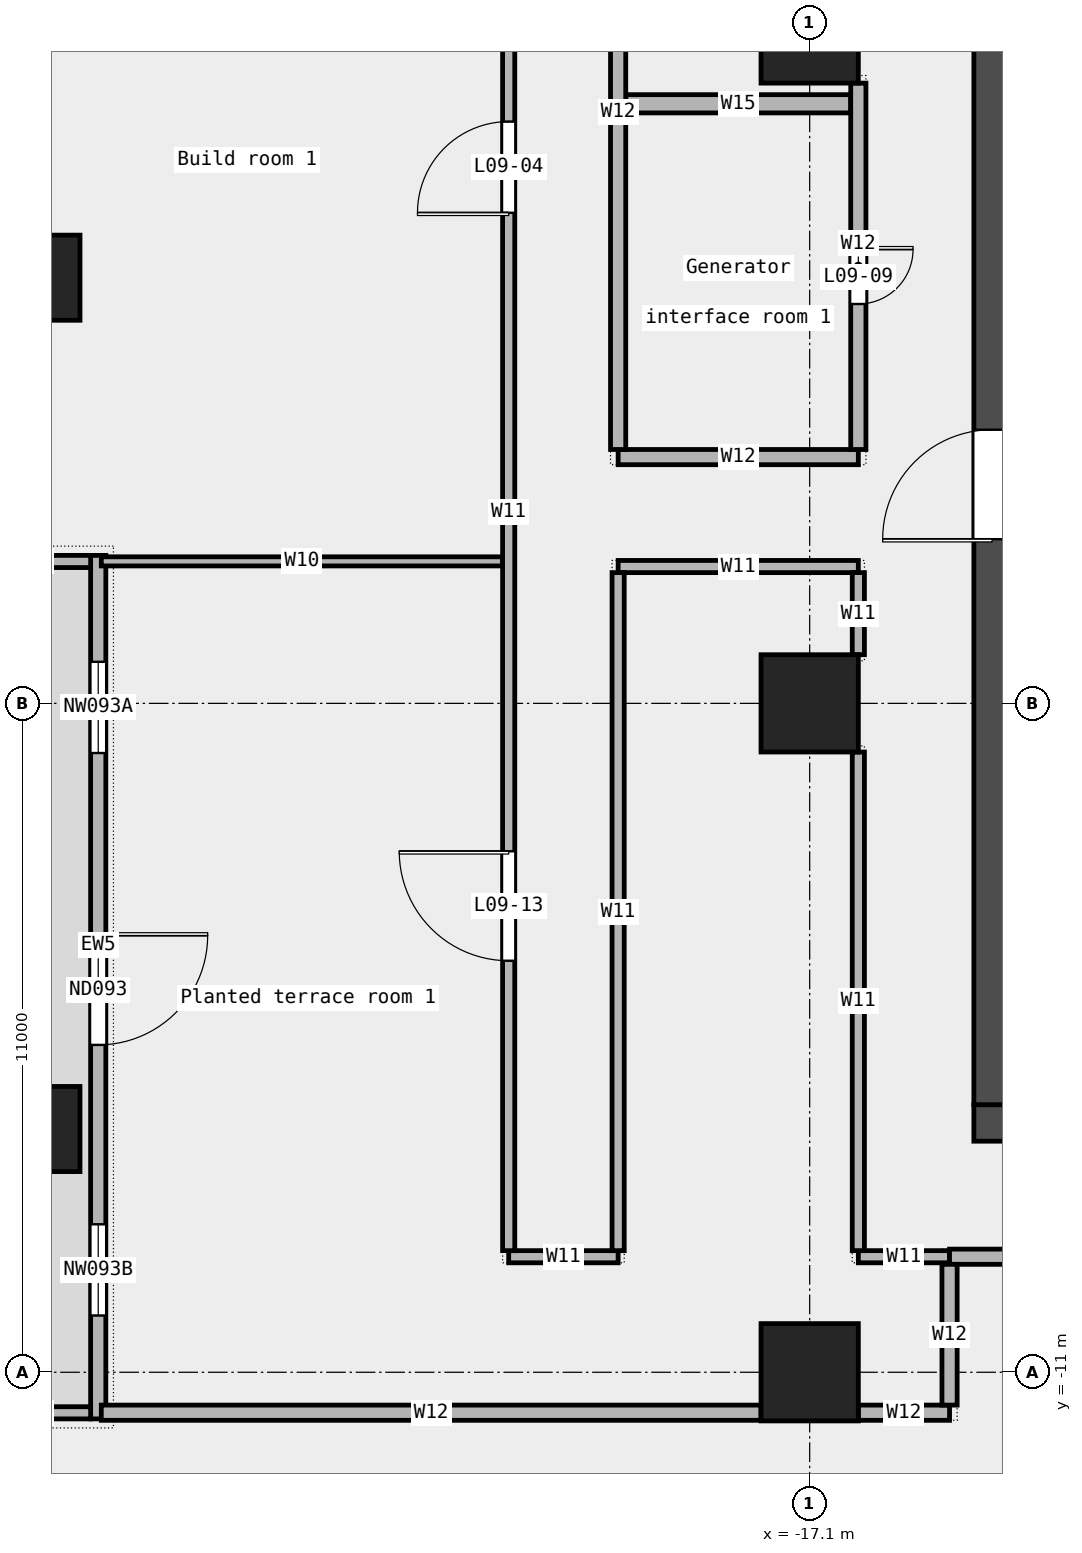
"""IFC4 building model, lengths in metres.
Left out: names, types, materials, properties, quantities, classifications, styles, units other than length and angle.
Written with IfcOpenShell. Run it as: python <this file> out.ifc"""

import sys

from ifc_helpers import new_model, si_unit, direction, frame, frame_2d, origin, origin_2d, place, context, subcontext, project, spatial, rectangle, extrude, element, fill, save


model = new_model("IFC4")
c1 = context("Model", 3, precision=1e-05, world=origin(), true_north=direction((0.0, 1.0)))
c2 = subcontext(c1, "Body", "Model", "MODEL_VIEW")
j1 = project(units=[si_unit("LENGTHUNIT", "METRE"), si_unit("PLANEANGLEUNIT", "RADIAN")], contexts=[c1])
p1 = place(None, origin())
s1 = spatial("IfcSite", under=j1, at=p1, CompositionType="ELEMENT")
p2 = place(p1, origin())
s2 = spatial("IfcBuilding", under=s1, at=p2, CompositionType="ELEMENT")
p3 = place(p2, frame((0.0, 0.0, 50.2)))
s3 = spatial("IfcBuildingStorey", under=s2, at=p3, CompositionType="ELEMENT", Elevation=50.2)
for number, where, z_axis, x_axis in (
    (1, (-29.8, 7.0, 0.0), (0.0, 0.0, 1.0), (1.0, 0.0, 0.0)),
    (2, (-29.8, -7.0, 0.0), (0.0, 0.0, 1.0), (1.0, 0.0, 0.0)),
):
    element("IfcColumn", number, at=place(p3, frame(where, z_axis=z_axis, x_axis=x_axis)), inside=s3, PredefinedType="COLUMN", context=c2, shape_type="SweptSolid", body=[
        extrude(rectangle(XDim=1.4, YDim=1.4, at=origin_2d()), origin(), (0.0, 0.0, 1.0), 4.35),
    ])
for number, where, z_axis, x_axis in (
    (3, (-17.1, -11.0, 0.0), (0.0, 0.0, 1.0), (1.0, 0.0, 0.0)),
    (4, (-17.1, 0.0, 0.0), (0.0, 0.0, 1.0), (1.0, 0.0, 0.0)),
    (5, (-17.1, 11.0, 0.0), (0.0, 0.0, 1.0), (1.0, 0.0, 0.0)),
):
    element("IfcColumn", number, at=place(p3, frame(where, z_axis=z_axis, x_axis=x_axis)), inside=s3, PredefinedType="COLUMN", context=c2, shape_type="SweptSolid", body=[
        extrude(rectangle(XDim=1.6, YDim=1.6, at=origin_2d()), origin(), (0.0, 0.0, 1.0), 4.35),
    ])
p4 = place(p3, frame((-28.8, 2.433, 0.0), z_axis=(0.0, 0.0, 1.0), x_axis=(0.0, -1.0, 0.0)))
e6 = element("IfcWall", 6, at=p4, inside=s3, PredefinedType="STANDARD", context=c2, shape_type="SweptSolid", body=[
    extrude(rectangle(XDim=14.2, YDim=0.25, at=frame_2d((7.1, 0.0))), origin(), (0.0, 0.0, 1.0), 4.35),
])
p5 = place(p4, frame((1.75, 0.0, 0.45)))
e7 = element("IfcOpeningElement", 7, at=p5, cuts=e6, PredefinedType="OPENING", context=c2, shape_type="SweptSolid", body=[
    extrude(rectangle(XDim=1.5, YDim=3.0, at=frame_2d((0.75, 1.5))), frame((0.0, 0.137, 0.0), z_axis=(0.0, -1.0, 0.0), x_axis=(1.0, 0.0, 0.0)), (0.0, 0.0, 1.0), 0.274),
])
p6 = place(p4, frame((6.25, 0.0, 0.0)))
e8 = element("IfcOpeningElement", 8, at=p6, cuts=e6, PredefinedType="OPENING", context=c2, shape_type="SweptSolid", body=[
    extrude(rectangle(XDim=1.8, YDim=2.4, at=frame_2d((0.9, 1.2))), frame((0.0, 0.137, 0.0), z_axis=(0.0, -1.0, 0.0), x_axis=(1.0, 0.0, 0.0)), (0.0, 0.0, 1.0), 0.274),
])
p7 = place(p4, frame((11.0, 0.0, 0.45)))
e9 = element("IfcOpeningElement", 9, at=p7, cuts=e6, PredefinedType="OPENING", context=c2, shape_type="SweptSolid", body=[
    extrude(rectangle(XDim=1.5, YDim=3.0, at=frame_2d((0.75, 1.5))), frame((0.0, 0.137, 0.0), z_axis=(0.0, -1.0, 0.0), x_axis=(1.0, 0.0, 0.0)), (0.0, 0.0, 1.0), 0.274),
])
for number, where, z_axis, x_axis in (
    (10, (-30.8, 2.333, 0.0), (0.0, 0.0, 1.0), (1.0, 0.0, 0.0)),
    (11, (-30.8, -11.667, 0.0), (0.0, 0.0, 1.0), (1.0, 0.0, 0.0)),
):
    element("IfcWall", number, at=place(p3, frame(where, z_axis=z_axis, x_axis=x_axis)), inside=s3, PredefinedType="STANDARD", context=c2, shape_type="SweptSolid", body=[
        extrude(rectangle(XDim=1.875, YDim=0.2, at=frame_2d((0.938, 0.0))), origin(), (0.0, 0.0, 1.0), 4.35),
    ])
p8 = place(p3, frame((-28.75, -11.665, 0.0), z_axis=(0.0, 0.0, 1.0), x_axis=(1.0, 0.0, 0.0)))
e12 = element("IfcWall", 12, at=p8, inside=s3, PredefinedType="PARTITIONING", context=c2, shape_type="SweptSolid", body=[
    extrude(rectangle(XDim=10.85, YDim=0.25, at=frame_2d((5.425, 0.0))), origin(), (0.0, 0.0, 1.0), 4.35),
])
p9 = place(p3, frame((-16.3, -11.665, 0.0), z_axis=(0.0, 0.0, 1.0), x_axis=(1.0, 0.0, 0.0)))
e13 = element("IfcWall", 13, at=p9, inside=s3, PredefinedType="PARTITIONING", context=c2, shape_type="SweptSolid", body=[
    extrude(rectangle(XDim=1.5, YDim=0.25, at=frame_2d((0.75, 0.0))), origin(), (0.0, 0.0, 1.0), 4.35),
])
p10 = place(p3, frame((-22.05, -9.1, 0.0), z_axis=(0.0, 0.0, 1.0), x_axis=(1.0, 0.0, 0.0)))
e14 = element("IfcWall", 14, at=p10, inside=s3, PredefinedType="PARTITIONING", context=c2, shape_type="SweptSolid", body=[
    extrude(rectangle(XDim=1.8, YDim=0.2, at=frame_2d((0.9, 0.0))), origin(), (0.0, 0.0, 1.0), 4.35),
])
p11 = place(p3, frame((-16.3, -9.1, 0.0), z_axis=(0.0, 0.0, 1.0), x_axis=(1.0, 0.0, 0.0)))
e15 = element("IfcWall", 15, at=p11, inside=s3, PredefinedType="PARTITIONING", context=c2, shape_type="SweptSolid", body=[
    extrude(rectangle(XDim=1.5, YDim=0.2, at=frame_2d((0.75, 0.0))), origin(), (0.0, 0.0, 1.0), 4.35),
])
p12 = place(p3, frame((-14.8, -9.1, 0.0), z_axis=(0.0, 0.0, 1.0), x_axis=(1.0, 0.0, 0.0)))
e16 = element("IfcWall", 16, at=p12, inside=s3, PredefinedType="PARTITIONING", context=c2, shape_type="SweptSolid", body=[
    extrude(rectangle(XDim=29.6, YDim=0.25, at=frame_2d((14.8, 0.0))), origin(), (0.0, 0.0, 1.0), 4.35),
])
p13 = place(p12, frame((4.802, 0.0, 0.0)))
e17 = element("IfcOpeningElement", 17, at=p13, cuts=e16, PredefinedType="OPENING", context=c2, shape_type="SweptSolid", body=[
    extrude(rectangle(XDim=1.8, YDim=2.1, at=frame_2d((0.9, 1.05))), frame((0.0, 0.137, 0.0), z_axis=(0.0, -1.0, 0.0), x_axis=(1.0, 0.0, 0.0)), (0.0, 0.0, 1.0), 0.274),
])
p14 = place(p12, frame((21.403, 0.0, 0.0)))
e18 = element("IfcOpeningElement", 18, at=p14, cuts=e16, PredefinedType="OPENING", context=c2, shape_type="SweptSolid", body=[
    extrude(rectangle(XDim=1.8, YDim=2.1, at=frame_2d((0.9, 1.05))), frame((0.0, 0.137, 0.0), z_axis=(0.0, -1.0, 0.0), x_axis=(1.0, 0.0, 0.0)), (0.0, 0.0, 1.0), 0.274),
])
p15 = place(p3, frame((-20.25, 2.25, 0.0), z_axis=(0.0, 0.0, 1.0), x_axis=(1.0, 0.0, 0.0)))
e19 = element("IfcWall", 19, at=p15, inside=s3, PredefinedType="PARTITIONING", context=c2, shape_type="SweptSolid", body=[
    extrude(rectangle(XDim=3.95, YDim=0.2, at=frame_2d((1.975, 0.0))), origin(), (0.0, 0.0, 1.0), 4.35),
])
p16 = place(p3, frame((-28.75, 2.335, 0.0), z_axis=(0.0, 0.0, 1.0), x_axis=(1.0, 0.0, 0.0)))
e20 = element("IfcWall", 20, at=p16, inside=s3, PredefinedType="PARTITIONING", context=c2, shape_type="SweptSolid", body=[
    extrude(rectangle(XDim=6.6, YDim=0.15, at=frame_2d((3.3, 0.0))), origin(), (0.0, 0.0, 1.0), 4.35),
])
p17 = place(p3, frame((-20.25, 4.05, 0.0), z_axis=(0.0, 0.0, 1.0), x_axis=(1.0, 0.0, 0.0)))
e21 = element("IfcWall", 21, at=p17, inside=s3, PredefinedType="PARTITIONING", context=c2, shape_type="SweptSolid", body=[
    extrude(rectangle(XDim=3.95, YDim=0.25, at=frame_2d((1.975, 0.0))), origin(), (0.0, 0.0, 1.0), 4.35),
])
p18 = place(p3, frame((-20.125, 9.86, 0.0), z_axis=(0.0, 0.0, 1.0), x_axis=(1.0, 0.0, 0.0)))
e22 = element("IfcWall", 22, at=p18, inside=s3, PredefinedType="PARTITIONING", context=c2, shape_type="SweptSolid", body=[
    extrude(rectangle(XDim=3.7, YDim=0.3, at=frame_2d((1.85, 0.0))), origin(), (0.0, 0.0, 1.0), 4.35),
])
p19 = place(p3, frame((-22.05, -9.0, 0.0), z_axis=(0.0, 0.0, 1.0), x_axis=(0.0, 1.0, 0.0)))
e23 = element("IfcWall", 23, at=p19, inside=s3, PredefinedType="PARTITIONING", context=c2, shape_type="SweptSolid", body=[
    extrude(rectangle(XDim=24.3, YDim=0.2, at=frame_2d((12.15, 0.0))), origin(), (0.0, 0.0, 1.0), 4.35),
])
p20 = place(p19, frame((17.067, 0.0, 0.0)))
e24 = element("IfcOpeningElement", 24, at=p20, cuts=e23, PredefinedType="OPENING", context=c2, shape_type="SweptSolid", body=[
    extrude(rectangle(XDim=1.5, YDim=2.1, at=frame_2d((0.75, 1.05))), frame((0.0, 0.112, 0.0), z_axis=(0.0, -1.0, 0.0), x_axis=(1.0, 0.0, 0.0)), (0.0, 0.0, 1.0), 0.224),
])
p21 = place(p19, frame((4.768, 0.0, 0.0)))
e25 = element("IfcOpeningElement", 25, at=p21, cuts=e23, PredefinedType="OPENING", context=c2, shape_type="SweptSolid", body=[
    extrude(rectangle(XDim=1.8, YDim=2.1, at=frame_2d((0.9, 1.05))), frame((0.0, 0.112, 0.0), z_axis=(0.0, -1.0, 0.0), x_axis=(1.0, 0.0, 0.0)), (0.0, 0.0, 1.0), 0.224),
])
p22 = place(p3, frame((-20.25, -9.0, 0.0), z_axis=(0.0, 0.0, 1.0), x_axis=(0.0, 1.0, 0.0)))
e26 = element("IfcWall", 26, at=p22, inside=s3, PredefinedType="PARTITIONING", context=c2, shape_type="SweptSolid", body=[
    extrude(rectangle(XDim=11.15, YDim=0.2, at=frame_2d((5.575, 0.0))), origin(), (0.0, 0.0, 1.0), 4.35),
])
p23 = place(p3, frame((-20.25, 4.175, 0.0), z_axis=(0.0, 0.0, 1.0), x_axis=(0.0, 1.0, 0.0)))
e27 = element("IfcWall", 27, at=p23, inside=s3, PredefinedType="PARTITIONING", context=c2, shape_type="SweptSolid", body=[
    extrude(rectangle(XDim=11.1, YDim=0.25, at=frame_2d((5.55, 0.0))), origin(), (0.0, 0.0, 1.0), 4.35),
])
p24 = place(p3, frame((-16.3, -9.0, 0.0), z_axis=(0.0, 0.0, 1.0), x_axis=(0.0, 1.0, 0.0)))
e28 = element("IfcWall", 28, at=p24, inside=s3, PredefinedType="PARTITIONING", context=c2, shape_type="SweptSolid", body=[
    extrude(rectangle(XDim=8.2, YDim=0.2, at=frame_2d((4.1, 0.0))), origin(), (0.0, 0.0, 1.0), 4.35),
])
p25 = place(p3, frame((-16.3, 0.8, 0.0), z_axis=(0.0, 0.0, 1.0), x_axis=(0.0, 1.0, 0.0)))
e29 = element("IfcWall", 29, at=p25, inside=s3, PredefinedType="PARTITIONING", context=c2, shape_type="SweptSolid", body=[
    extrude(rectangle(XDim=1.35, YDim=0.2, at=frame_2d((0.675, 0.0))), origin(), (0.0, 0.0, 1.0), 4.35),
])
p26 = place(p3, frame((-16.3, 4.175, 0.0), z_axis=(0.0, 0.0, 1.0), x_axis=(0.0, 1.0, 0.0)))
e30 = element("IfcWall", 30, at=p26, inside=s3, PredefinedType="PARTITIONING", context=c2, shape_type="SweptSolid", body=[
    extrude(rectangle(XDim=6.025, YDim=0.25, at=frame_2d((3.012, 0.0))), origin(), (0.0, 0.0, 1.0), 4.35),
])
p27 = place(p26, frame((2.393, 0.0, 0.0)))
e31 = element("IfcOpeningElement", 31, at=p27, cuts=e30, PredefinedType="OPENING", context=c2, shape_type="SweptSolid", body=[
    extrude(rectangle(XDim=0.9, YDim=2.1, at=frame_2d((0.45, 1.05))), frame((0.0, 0.137, 0.0), z_axis=(0.0, -1.0, 0.0), x_axis=(1.0, 0.0, 0.0)), (0.0, 0.0, 1.0), 0.274),
])
p28 = place(p3, frame((-14.8, -11.54, 0.0), z_axis=(0.0, 0.0, 1.0), x_axis=(0.0, 1.0, 0.0)))
e32 = element("IfcWall", 32, at=p28, inside=s3, PredefinedType="PARTITIONING", context=c2, shape_type="SweptSolid", body=[
    extrude(rectangle(XDim=2.315, YDim=0.25, at=frame_2d((1.157, 0.0))), origin(), (0.0, 0.0, 1.0), 4.35),
])
p29 = place(p3, frame((-14.4, -6.9, 0.0), z_axis=(0.0, 0.0, 1.0), x_axis=(1.0, 0.0, 0.0)))
e33 = element("IfcWall", 33, at=p29, inside=s3, PredefinedType="SHEAR", context=c2, shape_type="SweptSolid", body=[
    extrude(rectangle(XDim=28.8, YDim=0.6, at=frame_2d((14.4, 0.0))), origin(), (0.0, 0.0, 1.0), 4.5),
])
p30 = place(p29, frame((4.9, 0.0, 0.0)))
e34 = element("IfcOpeningElement", 34, at=p30, cuts=e33, PredefinedType="OPENING", context=c2, shape_type="SweptSolid", body=[
    extrude(rectangle(XDim=1.0, YDim=2.1, at=frame_2d((0.5, 1.05))), frame((0.0, 0.312, 0.0), z_axis=(0.0, -1.0, 0.0), x_axis=(1.0, 0.0, 0.0)), (0.0, 0.0, 1.0), 0.624),
])
p31 = place(p29, frame((8.462, 0.0, 0.0)))
e35 = element("IfcOpeningElement", 35, at=p31, cuts=e33, PredefinedType="OPENING", context=c2, shape_type="SweptSolid", body=[
    extrude(rectangle(XDim=1.0, YDim=2.1, at=frame_2d((0.5, 1.05))), frame((0.0, 0.312, 0.0), z_axis=(0.0, -1.0, 0.0), x_axis=(1.0, 0.0, 0.0)), (0.0, 0.0, 1.0), 0.624),
])
p32 = place(p29, frame((13.425, 0.0, 0.0)))
e36 = element("IfcOpeningElement", 36, at=p32, cuts=e33, PredefinedType="OPENING", context=c2, shape_type="SweptSolid", body=[
    extrude(rectangle(XDim=1.2, YDim=2.1, at=frame_2d((0.6, 1.05))), frame((0.0, 0.312, 0.0), z_axis=(0.0, -1.0, 0.0), x_axis=(1.0, 0.0, 0.0)), (0.0, 0.0, 1.0), 0.624),
])
p33 = place(p29, frame((18.75, 0.0, 0.0)))
e37 = element("IfcOpeningElement", 37, at=p33, cuts=e33, PredefinedType="OPENING", context=c2, shape_type="SweptSolid", body=[
    extrude(rectangle(XDim=1.8, YDim=2.1, at=frame_2d((0.9, 1.05))), frame((0.0, 0.312, 0.0), z_axis=(0.0, -1.0, 0.0), x_axis=(1.0, 0.0, 0.0)), (0.0, 0.0, 1.0), 0.624),
])
p34 = place(p29, frame((23.087, 0.0, 0.0)))
e38 = element("IfcOpeningElement", 38, at=p34, cuts=e33, PredefinedType="OPENING", context=c2, shape_type="SweptSolid", body=[
    extrude(rectangle(XDim=1.0, YDim=2.1, at=frame_2d((0.5, 1.05))), frame((0.0, 0.312, 0.0), z_axis=(0.0, -1.0, 0.0), x_axis=(1.0, 0.0, 0.0)), (0.0, 0.0, 1.0), 0.624),
])
p35 = place(p3, frame((-14.1, -6.6, 0.0), z_axis=(0.0, 0.0, 1.0), x_axis=(0.0, 1.0, 0.0)))
e39 = element("IfcWall", 39, at=p35, inside=s3, PredefinedType="SHEAR", context=c2, shape_type="SweptSolid", body=[
    extrude(rectangle(XDim=19.5, YDim=0.6, at=frame_2d((9.75, 0.0))), origin(), (0.0, 0.0, 1.0), 4.5),
])
p36 = place(p35, frame((9.3, 0.0, 0.0)))
e40 = element("IfcOpeningElement", 40, at=p36, cuts=e39, PredefinedType="OPENING", context=c2, shape_type="SweptSolid", body=[
    extrude(rectangle(XDim=1.8, YDim=2.1, at=frame_2d((0.9, 1.05))), frame((0.0, 0.312, 0.0), z_axis=(0.0, -1.0, 0.0), x_axis=(1.0, 0.0, 0.0)), (0.0, 0.0, 1.0), 0.624),
])
p37 = place(p5, origin())
e41 = element("IfcWindow", 41, at=p37, inside=s3, PartitioningType="SINGLE_PANEL", PredefinedType="WINDOW", context=c2, shape_type="SweptSolid", body=[
    extrude(rectangle(XDim=1.5, YDim=3.0, at=frame_2d((0.75, 1.5))), frame((0.0, 0.03, 0.0), z_axis=(0.0, -1.0, 0.0), x_axis=(1.0, 0.0, 0.0)), (0.0, 0.0, 1.0), 0.06),
])
fill(e7, e41)
p38 = place(p6, origin())
e42 = element("IfcDoor", 42, at=p38, inside=s3, OperationType="DOUBLE_DOOR_SINGLE_SWING", PredefinedType="DOOR", context=c2, shape_type="SweptSolid", body=[
    extrude(rectangle(XDim=1.8, YDim=2.4, at=frame_2d((0.9, 1.2))), frame((0.0, 0.025, 0.0), z_axis=(0.0, -1.0, 0.0), x_axis=(1.0, 0.0, 0.0)), (0.0, 0.0, 1.0), 0.05),
])
fill(e8, e42)
p39 = place(p7, origin())
e43 = element("IfcWindow", 43, at=p39, inside=s3, PartitioningType="SINGLE_PANEL", PredefinedType="WINDOW", context=c2, shape_type="SweptSolid", body=[
    extrude(rectangle(XDim=1.5, YDim=3.0, at=frame_2d((0.75, 1.5))), frame((0.0, 0.03, 0.0), z_axis=(0.0, -1.0, 0.0), x_axis=(1.0, 0.0, 0.0)), (0.0, 0.0, 1.0), 0.06),
])
fill(e9, e43)
p40 = place(p20, origin())
e44 = element("IfcDoor", 44, at=p40, inside=s3, OperationType="DOUBLE_DOOR_SINGLE_SWING", PredefinedType="DOOR", context=c2, shape_type="SweptSolid", body=[
    extrude(rectangle(XDim=1.5, YDim=2.1, at=frame_2d((0.75, 1.05))), frame((0.0, 0.025, 0.0), z_axis=(0.0, -1.0, 0.0), x_axis=(1.0, 0.0, 0.0)), (0.0, 0.0, 1.0), 0.05),
])
fill(e24, e44)
p41 = place(p27, origin())
e45 = element("IfcDoor", 45, at=p41, inside=s3, OperationType="SINGLE_SWING_LEFT", PredefinedType="DOOR", context=c2, shape_type="SweptSolid", body=[
    extrude(rectangle(XDim=0.9, YDim=2.1, at=frame_2d((0.45, 1.05))), frame((0.0, 0.025, 0.0), z_axis=(0.0, -1.0, 0.0), x_axis=(1.0, 0.0, 0.0)), (0.0, 0.0, 1.0), 0.05),
])
fill(e31, e45)
p42 = place(p21, origin())
e46 = element("IfcDoor", 46, at=p42, inside=s3, OperationType="DOUBLE_DOOR_SINGLE_SWING", PredefinedType="DOOR", context=c2, shape_type="SweptSolid", body=[
    extrude(rectangle(XDim=1.8, YDim=2.1, at=frame_2d((0.9, 1.05))), frame((0.0, 0.025, 0.0), z_axis=(0.0, -1.0, 0.0), x_axis=(1.0, 0.0, 0.0)), (0.0, 0.0, 1.0), 0.05),
])
fill(e25, e46)
p43 = place(p36, origin())
e47 = element("IfcDoor", 47, at=p43, inside=s3, OperationType="DOUBLE_DOOR_SINGLE_SWING", PredefinedType="DOOR", context=c2, shape_type="SweptSolid", body=[
    extrude(rectangle(XDim=1.8, YDim=2.1, at=frame_2d((0.9, 1.05))), frame((0.0, 0.025, 0.0), z_axis=(0.0, -1.0, 0.0), x_axis=(1.0, 0.0, 0.0)), (0.0, 0.0, 1.0), 0.05),
])
fill(e40, e47)
save(model, sys.argv[1])
